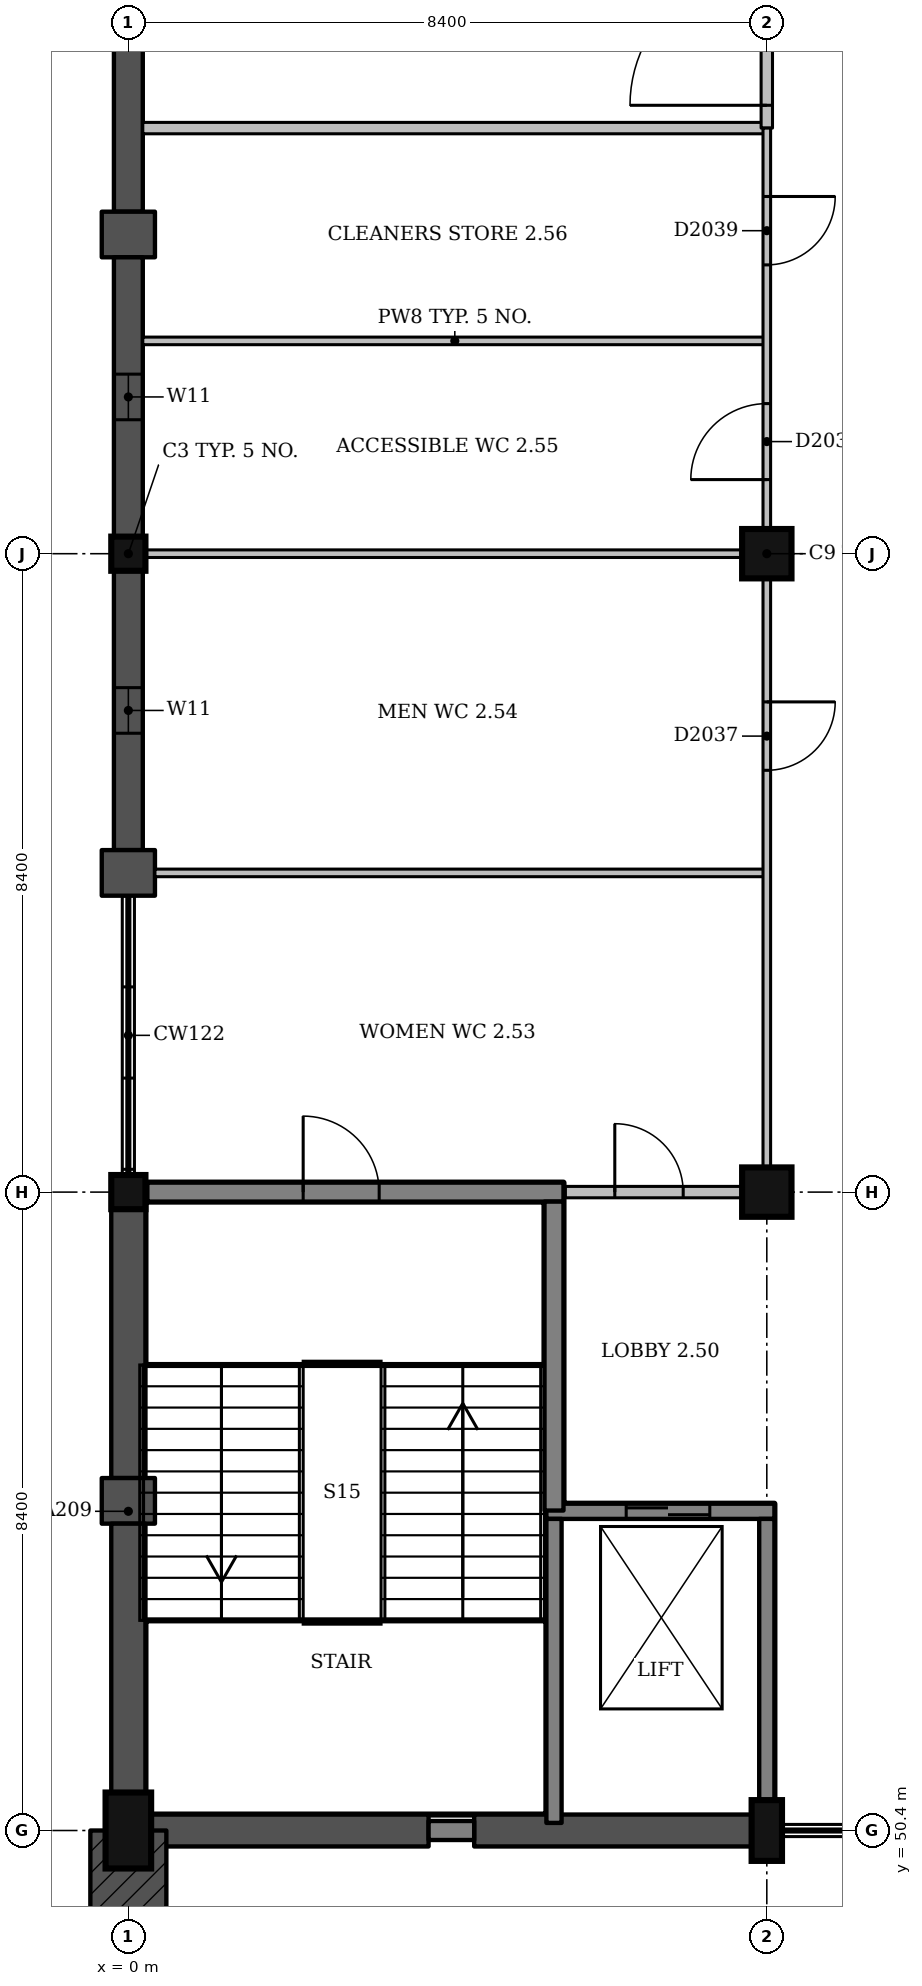
"""IFC4 building model, lengths in metres.
Left out: names, types, materials, properties, quantities, classifications, styles, units other than length and angle.
Written with IfcOpenShell. Run it as: python <this file> out.ifc"""

import sys

from ifc_helpers import new_model, si_unit, direction, frame, frame_2d, origin, origin_2d, place, context, subcontext, project, spatial, polyline, rectangle, outline, extrude, element, fill, save


model = new_model("IFC4")
c1 = context("Model", 3, precision=1e-05, world=origin(), true_north=direction((0.0, 1.0)))
c2 = subcontext(c1, "Body", "Model", "MODEL_VIEW")
j1 = project(units=[si_unit("LENGTHUNIT", "METRE"), si_unit("PLANEANGLEUNIT", "RADIAN")], contexts=[c1])
p1 = place(None, origin())
s1 = spatial("IfcSite", under=j1, at=p1, CompositionType="ELEMENT")
p2 = place(p1, origin())
s2 = spatial("IfcBuilding", under=s1, at=p2, CompositionType="ELEMENT")
p3 = place(p2, frame((0.0, 0.0, 9.0)))
s3 = spatial("IfcBuildingStorey", under=s2, at=p3, CompositionType="ELEMENT", Elevation=9.0)
p4 = place(p3, frame((0.0, 50.4, 0.0), z_axis=(0.0, 0.0, 1.0), x_axis=(1.0, 0.0, 0.0)))
e1 = element("IfcColumn", 1, at=p4, inside=s3, PredefinedType="COLUMN", context=c2, shape_type="SweptSolid", body=[
    extrude(rectangle(XDim=0.6, YDim=1.0, at=origin_2d()), origin(), (0.0, 0.0, 1.0), 4.5),
])
p5 = place(p3, frame((8.4, 50.4, 0.0), z_axis=(0.0, 0.0, 1.0), x_axis=(1.0, 0.0, 0.0)))
e2 = element("IfcColumn", 2, at=p5, inside=s3, PredefinedType="COLUMN", context=c2, shape_type="SweptSolid", body=[
    extrude(rectangle(XDim=0.4, YDim=0.8, at=origin_2d()), origin(), (0.0, 0.0, 1.0), 4.5),
])
for number, where, z_axis, x_axis in (
    (3, (0.0, 58.8, 0.0), (0.0, 0.0, 1.0), (1.0, 0.0, 0.0)),
    (4, (0.0, 67.2, 0.0), (0.0, 0.0, 1.0), (1.0, 0.0, 0.0)),
):
    element("IfcColumn", number, at=place(p3, frame(where, z_axis=z_axis, x_axis=x_axis)), inside=s3, PredefinedType="COLUMN", context=c2, shape_type="SweptSolid", body=[
        extrude(rectangle(XDim=0.45, YDim=0.45, at=origin_2d()), origin(), (0.0, 0.0, 1.0), 4.5),
    ])
for number, where, z_axis, x_axis in (
    (5, (8.4, 58.8, 0.0), (0.0, 0.0, 1.0), (1.0, 0.0, 0.0)),
    (6, (8.4, 67.2, 0.0), (0.0, 0.0, 1.0), (1.0, 0.0, 0.0)),
):
    element("IfcColumn", number, at=place(p3, frame(where, z_axis=z_axis, x_axis=x_axis)), inside=s3, PredefinedType="COLUMN", context=c2, shape_type="SweptSolid", body=[
        extrude(rectangle(XDim=0.65, YDim=0.65, at=origin_2d()), origin(), (0.0, 0.0, 1.0), 4.5),
    ])
p6 = place(p3, frame((5.5, 54.6, 0.0), z_axis=(0.0, 0.0, 1.0), x_axis=(1.0, 0.0, 0.0)))
e7 = element("IfcWall", 7, at=p6, inside=s3, PredefinedType="SHEAR", context=c2, shape_type="SweptSolid", body=[
    extrude(rectangle(XDim=3.0, YDim=0.2, at=frame_2d((1.5, 0.0))), origin(), (0.0, 0.0, 1.0), 4.5),
])
p7 = place(p6, frame((1.05, 0.0, 0.0)))
e8 = element("IfcOpeningElement", 8, at=p7, cuts=e7, PredefinedType="OPENING", context=c2, shape_type="SweptSolid", body=[
    extrude(rectangle(XDim=1.1, YDim=2.1, at=frame_2d((0.55, 1.05))), frame((0.0, 0.11, 0.0), z_axis=(0.0, -1.0, 0.0), x_axis=(1.0, 0.0, 0.0)), (0.0, 0.0, 1.0), 0.22),
])
p8 = place(p3, frame((5.6, 50.5, 0.0), z_axis=(0.0, 0.0, 1.0), x_axis=(0.0, 1.0, 0.0)))
e9 = element("IfcWall", 9, at=p8, inside=s3, PredefinedType="SHEAR", context=c2, shape_type="SweptSolid", body=[
    extrude(rectangle(XDim=4.0, YDim=0.2, at=frame_2d((2.0, 0.0))), origin(), (0.0, 0.0, 1.0), 4.5),
])
p9 = place(p3, frame((8.4, 50.8, 0.0), z_axis=(0.0, 0.0, 1.0), x_axis=(0.0, 1.0, 0.0)))
e10 = element("IfcWall", 10, at=p9, inside=s3, PredefinedType="SHEAR", context=c2, shape_type="SweptSolid", body=[
    extrude(rectangle(XDim=3.7, YDim=0.2, at=frame_2d((1.85, 0.0))), origin(), (0.0, 0.0, 1.0), 4.5),
])
p10 = place(p3, frame((0.25, 58.8, 0.0), z_axis=(0.0, 0.0, 1.0), x_axis=(1.0, 0.0, 0.0)))
e11 = element("IfcWall", 11, at=p10, inside=s3, PredefinedType="SHEAR", context=c2, shape_type="SweptSolid", body=[
    extrude(rectangle(XDim=5.475, YDim=0.25, at=frame_2d((2.738, 0.0))), origin(), (0.0, 0.0, 1.0), 4.5),
])
p11 = place(p10, frame((2.05, 0.0, 0.0)))
e12 = element("IfcOpeningElement", 12, at=p11, cuts=e11, PredefinedType="OPENING", context=c2, shape_type="SweptSolid", body=[
    extrude(rectangle(XDim=1.0, YDim=2.1, at=frame_2d((0.5, 1.05))), frame((0.0, 0.135, 0.0), z_axis=(0.0, -1.0, 0.0), x_axis=(1.0, 0.0, 0.0)), (0.0, 0.0, 1.0), 0.27),
])
p12 = place(p3, frame((5.6, 54.61, 0.0), z_axis=(0.0, 0.0, 1.0), x_axis=(0.0, 1.0, 0.0)))
e13 = element("IfcWall", 13, at=p12, inside=s3, PredefinedType="SHEAR", context=c2, shape_type="SweptSolid", body=[
    extrude(rectangle(XDim=4.065, YDim=0.25, at=frame_2d((2.032, 0.0))), origin(), (0.0, 0.0, 1.0), 4.5),
])
p13 = place(p3, frame((0.0, 16.8, 2.0), z_axis=(0.0, 0.0, 1.0), x_axis=(0.0, 1.0, 0.0)))
e14 = element("IfcWall", 14, at=p13, inside=s3, PredefinedType="SOLIDWALL", context=c2, shape_type="SweptSolid", body=[
    extrude(outline(polyline([(0.0, 0.0), (33.6, 0.0), (33.6, 16.5), (31.5, 15.753), (29.4, 15.115), (27.3, 14.583), (25.2, 14.152), (23.1, 13.819), (21.0, 13.583), (18.9, 13.442), (16.8, 13.395), (14.7, 13.442), (12.6, 13.583), (10.5, 13.819), (8.4, 14.152), (6.3, 14.583), (4.2, 15.115), (2.1, 15.753), (0.0, 16.5), (0.0, 0.0)])), frame((0.0, 0.5, 0.0), z_axis=(0.0, -1.0, 0.0), x_axis=(1.0, 0.0, 0.0)), (0.0, 0.0, 1.0), 1.0),
])
p14 = place(p3, frame((0.0, 75.375, 0.0), z_axis=(0.0, 0.0, 1.0), x_axis=(0.0, -1.0, 0.0)))
e15 = element("IfcWall", 15, at=p14, inside=s3, PredefinedType="SOLIDWALL", context=c2, shape_type="SweptSolid", body=[
    extrude(rectangle(XDim=3.675, YDim=0.38, at=frame_2d((1.837, 0.0))), origin(), (0.0, 0.0, 1.0), 3.35),
])
p15 = place(p3, frame((0.0, 71.7, 0.0), z_axis=(0.0, 0.0, 1.0), x_axis=(0.0, -1.0, 0.0)))
e16 = element("IfcWall", 16, at=p15, inside=s3, PredefinedType="SOLIDWALL", context=c2, shape_type="SweptSolid", body=[
    extrude(rectangle(XDim=0.6, YDim=0.7, at=frame_2d((0.3, 0.0))), origin(), (0.0, 0.0, 1.0), 3.35),
])
p16 = place(p3, frame((0.0, 71.1, 0.0), z_axis=(0.0, 0.0, 1.0), x_axis=(0.0, -1.0, 0.0)))
e17 = element("IfcWall", 17, at=p16, inside=s3, PredefinedType="SOLIDWALL", context=c2, shape_type="SweptSolid", body=[
    extrude(rectangle(XDim=3.675, YDim=0.38, at=frame_2d((1.837, 0.0))), origin(), (0.0, 0.0, 1.0), 3.35),
])
p17 = place(p16, frame((1.538, 0.0, 1.5)))
e18 = element("IfcOpeningElement", 18, at=p17, cuts=e17, PredefinedType="OPENING", context=c2, shape_type="SweptSolid", body=[
    extrude(rectangle(XDim=0.6, YDim=1.2, at=frame_2d((0.3, 0.6))), frame((0.0, 0.2, 0.0), z_axis=(0.0, -1.0, 0.0), x_axis=(1.0, 0.0, 0.0)), (0.0, 0.0, 1.0), 0.4),
])
p18 = place(p3, frame((0.0, 66.975, 0.0), z_axis=(0.0, 0.0, 1.0), x_axis=(0.0, -1.0, 0.0)))
e19 = element("IfcWall", 19, at=p18, inside=s3, PredefinedType="SOLIDWALL", context=c2, shape_type="SweptSolid", body=[
    extrude(rectangle(XDim=3.675, YDim=0.38, at=frame_2d((1.837, 0.0))), origin(), (0.0, 0.0, 1.0), 3.35),
])
p19 = place(p18, frame((1.538, 0.0, 1.5)))
e20 = element("IfcOpeningElement", 20, at=p19, cuts=e19, PredefinedType="OPENING", context=c2, shape_type="SweptSolid", body=[
    extrude(rectangle(XDim=0.6, YDim=1.2, at=frame_2d((0.3, 0.6))), frame((0.0, 0.2, 0.0), z_axis=(0.0, -1.0, 0.0), x_axis=(1.0, 0.0, 0.0)), (0.0, 0.0, 1.0), 0.4),
])
p20 = place(p3, frame((0.0, 63.3, 0.0), z_axis=(0.0, 0.0, 1.0), x_axis=(0.0, -1.0, 0.0)))
e21 = element("IfcWall", 21, at=p20, inside=s3, PredefinedType="SOLIDWALL", context=c2, shape_type="SweptSolid", body=[
    extrude(rectangle(XDim=0.6, YDim=0.7, at=frame_2d((0.3, 0.0))), origin(), (0.0, 0.0, 1.0), 3.35),
])
p21 = place(p3, frame((0.0, 58.575, 0.0), z_axis=(0.0, 0.0, 1.0), x_axis=(0.0, -1.0, 0.0)))
e22 = element("IfcWall", 22, at=p21, inside=s3, PredefinedType="SOLIDWALL", context=c2, shape_type="SweptSolid", body=[
    extrude(rectangle(XDim=3.537, YDim=0.45, at=frame_2d((1.769, 0.0))), origin(), (0.0, 0.0, 1.0), 4.5),
])
p22 = place(p3, frame((0.0, 55.038, 0.0), z_axis=(0.0, 0.0, 1.0), x_axis=(0.0, -1.0, 0.0)))
e23 = element("IfcWall", 23, at=p22, inside=s3, PredefinedType="SOLIDWALL", context=c2, shape_type="SweptSolid", body=[
    extrude(rectangle(XDim=0.6, YDim=0.7, at=frame_2d((0.3, 0.0))), origin(), (0.0, 0.0, 1.0), 4.5),
])
p23 = place(p3, frame((0.0, 54.438, 0.0), z_axis=(0.0, 0.0, 1.0), x_axis=(0.0, -1.0, 0.0)))
e24 = element("IfcWall", 24, at=p23, inside=s3, PredefinedType="SOLIDWALL", context=c2, shape_type="SweptSolid", body=[
    extrude(rectangle(XDim=3.538, YDim=0.45, at=frame_2d((1.769, 0.0))), origin(), (0.0, 0.0, 1.0), 4.5),
])
for number, where, z_axis, x_axis in (
    (25, (0.3, 50.4, 0.0), (0.0, 0.0, 1.0), (1.0, 0.0, 0.0)),
    (26, (4.55, 50.4, 0.0), (0.0, 0.0, 1.0), (1.0, 0.0, 0.0)),
):
    element("IfcWall", number, at=place(p3, frame(where, z_axis=z_axis, x_axis=x_axis)), inside=s3, PredefinedType="SOLIDWALL", context=c2, shape_type="SweptSolid", body=[
        extrude(rectangle(XDim=3.65, YDim=0.42, at=frame_2d((1.825, 0.0))), origin(), (0.0, 0.0, 1.0), 3.65),
    ])
p24 = place(p3, frame((5.75, 58.8, 0.0), z_axis=(0.0, 0.0, 1.0), x_axis=(1.0, 0.0, 0.0)))
e27 = element("IfcWall", 27, at=p24, inside=s3, PredefinedType="PARTITIONING", context=c2, shape_type="SweptSolid", body=[
    extrude(rectangle(XDim=2.325, YDim=0.15, at=frame_2d((1.163, 0.0))), origin(), (0.0, 0.0, 1.0), 3.5),
])
p25 = place(p24, frame((0.65, 0.0, 0.0)))
e28 = element("IfcOpeningElement", 28, at=p25, cuts=e27, PredefinedType="OPENING", context=c2, shape_type="SweptSolid", body=[
    extrude(rectangle(XDim=0.9, YDim=2.1, at=frame_2d((0.45, 1.05))), frame((0.0, 0.085, 0.0), z_axis=(0.0, -1.0, 0.0), x_axis=(1.0, 0.0, 0.0)), (0.0, 0.0, 1.0), 0.17),
])
p26 = place(p3, frame((0.35, 63.0, 0.0), z_axis=(0.0, 0.0, 1.0), x_axis=(1.0, 0.0, 0.0)))
e29 = element("IfcWall", 29, at=p26, inside=s3, PredefinedType="PARTITIONING", context=c2, shape_type="SweptSolid", body=[
    extrude(rectangle(XDim=8.05, YDim=0.1, at=frame_2d((4.025, 0.0))), origin(), (0.0, 0.0, 1.0), 3.4),
])
p27 = place(p3, frame((0.225, 67.2, 0.0), z_axis=(0.0, 0.0, 1.0), x_axis=(1.0, 0.0, 0.0)))
e30 = element("IfcWall", 30, at=p27, inside=s3, PredefinedType="PARTITIONING", context=c2, shape_type="SweptSolid", body=[
    extrude(rectangle(XDim=7.85, YDim=0.1, at=frame_2d((3.925, 0.0))), origin(), (0.0, 0.0, 1.0), 3.4),
])
p28 = place(p3, frame((0.19, 70.0, 0.0), z_axis=(0.0, 0.0, 1.0), x_axis=(1.0, 0.0, 0.0)))
e31 = element("IfcWall", 31, at=p28, inside=s3, PredefinedType="PARTITIONING", context=c2, shape_type="SweptSolid", body=[
    extrude(rectangle(XDim=8.21, YDim=0.1, at=frame_2d((4.105, 0.0))), origin(), (0.0, 0.0, 1.0), 3.35),
])
p29 = place(p3, frame((0.19, 72.8, 0.0), z_axis=(0.0, 0.0, 1.0), x_axis=(1.0, 0.0, 0.0)))
e32 = element("IfcWall", 32, at=p29, inside=s3, PredefinedType="PARTITIONING", context=c2, shape_type="SweptSolid", body=[
    extrude(rectangle(XDim=8.21, YDim=0.15, at=frame_2d((4.105, 0.0))), origin(), (0.0, 0.0, 1.0), 3.35),
])
p30 = place(p3, frame((8.4, 72.8, 0.0), z_axis=(0.0, 0.0, 1.0), x_axis=(0.0, 1.0, 0.0)))
e33 = element("IfcWall", 33, at=p30, inside=s3, PredefinedType="PARTITIONING", context=c2, shape_type="SweptSolid", body=[
    extrude(rectangle(XDim=2.475, YDim=0.15, at=frame_2d((1.237, 0.0))), origin(), (0.0, 0.0, 1.0), 3.4),
])
p31 = place(p30, frame((0.3, 0.0, 0.0)))
e34 = element("IfcOpeningElement", 34, at=p31, cuts=e33, PredefinedType="OPENING", context=c2, shape_type="SweptSolid", body=[
    extrude(rectangle(XDim=1.8, YDim=2.1, at=frame_2d((0.9, 1.05))), frame((0.0, 0.085, 0.0), z_axis=(0.0, -1.0, 0.0), x_axis=(1.0, 0.0, 0.0)), (0.0, 0.0, 1.0), 0.17),
])
p32 = place(p3, frame((8.4, 59.125, 0.0), z_axis=(0.0, 0.0, 1.0), x_axis=(0.0, 1.0, 0.0)))
e35 = element("IfcWall", 35, at=p32, inside=s3, PredefinedType="PARTITIONING", context=c2, shape_type="SweptSolid", body=[
    extrude(rectangle(XDim=7.75, YDim=0.1, at=frame_2d((3.875, 0.0))), origin(), (0.0, 0.0, 1.0), 3.4),
])
p33 = place(p32, frame((5.225, 0.0, 0.0)))
e36 = element("IfcOpeningElement", 36, at=p33, cuts=e35, PredefinedType="OPENING", context=c2, shape_type="SweptSolid", body=[
    extrude(rectangle(XDim=0.9, YDim=2.1, at=frame_2d((0.45, 1.05))), frame((0.0, 0.06, 0.0), z_axis=(0.0, -1.0, 0.0), x_axis=(1.0, 0.0, 0.0)), (0.0, 0.0, 1.0), 0.12),
])
p34 = place(p3, frame((8.4, 67.525, 0.0), z_axis=(0.0, 0.0, 1.0), x_axis=(0.0, 1.0, 0.0)))
e37 = element("IfcWall", 37, at=p34, inside=s3, PredefinedType="PARTITIONING", context=c2, shape_type="SweptSolid", body=[
    extrude(rectangle(XDim=5.275, YDim=0.1, at=frame_2d((2.638, 0.0))), origin(), (0.0, 0.0, 1.0), 3.4),
])
p35 = place(p34, frame((0.65, 0.0, 0.0)))
e38 = element("IfcOpeningElement", 38, at=p35, cuts=e37, PredefinedType="OPENING", context=c2, shape_type="SweptSolid", body=[
    extrude(rectangle(XDim=1.0, YDim=2.1, at=frame_2d((0.5, 1.05))), frame((0.0, 0.06, 0.0), z_axis=(0.0, -1.0, 0.0), x_axis=(1.0, 0.0, 0.0)), (0.0, 0.0, 1.0), 0.12),
])
p36 = place(p34, frame((3.475, 0.0, 0.0)))
e39 = element("IfcOpeningElement", 39, at=p36, cuts=e37, PredefinedType="OPENING", context=c2, shape_type="SweptSolid", body=[
    extrude(rectangle(XDim=0.9, YDim=2.1, at=frame_2d((0.45, 1.05))), frame((0.0, 0.06, 0.0), z_axis=(0.0, -1.0, 0.0), x_axis=(1.0, 0.0, 0.0)), (0.0, 0.0, 1.0), 0.12),
])
p37 = place(p3, frame((3.95, 50.4, 0.0), z_axis=(0.0, 0.0, 1.0), x_axis=(1.0, 0.0, 0.0)))
e40 = element("IfcWall", 40, at=p37, inside=s3, PredefinedType="SHEAR", context=c2, shape_type="SweptSolid", body=[
    extrude(rectangle(XDim=0.6, YDim=0.25, at=frame_2d((0.3, 0.0))), origin(), (0.0, 0.0, 1.0), 4.5),
])
p38 = place(p17, origin())
e41 = element("IfcWindow", 41, at=p38, inside=s3, PartitioningType="SINGLE_PANEL", PredefinedType="WINDOW", context=c2, shape_type="SweptSolid", body=[
    extrude(rectangle(XDim=0.6, YDim=1.2, at=frame_2d((0.3, 0.6))), frame((0.0, 0.15, 0.0), z_axis=(0.0, -1.0, 0.0), x_axis=(1.0, 0.0, 0.0)), (0.0, 0.0, 1.0), 0.06),
])
fill(e18, e41)
p39 = place(p19, origin())
e42 = element("IfcWindow", 42, at=p39, inside=s3, PartitioningType="SINGLE_PANEL", PredefinedType="WINDOW", context=c2, shape_type="SweptSolid", body=[
    extrude(rectangle(XDim=0.6, YDim=1.2, at=frame_2d((0.3, 0.6))), frame((0.0, 0.15, 0.0), z_axis=(0.0, -1.0, 0.0), x_axis=(1.0, 0.0, 0.0)), (0.0, 0.0, 1.0), 0.06),
])
fill(e20, e42)
p40 = place(p25, origin())
e43 = element("IfcDoor", 43, at=p40, inside=s3, OperationType="SINGLE_SWING_LEFT", PredefinedType="DOOR", context=c2, shape_type="SweptSolid", body=[
    extrude(rectangle(XDim=0.9, YDim=2.1, at=frame_2d((0.45, 1.05))), frame((0.0, 0.025, 0.0), z_axis=(0.0, -1.0, 0.0), x_axis=(1.0, 0.0, 0.0)), (0.0, 0.0, 1.0), 0.05),
])
fill(e28, e43)
p41 = place(p33, origin())
e44 = element("IfcDoor", 44, at=p41, inside=s3, OperationType="SINGLE_SWING_RIGHT", PredefinedType="DOOR", context=c2, shape_type="SweptSolid", body=[
    extrude(rectangle(XDim=0.9, YDim=2.1, at=frame_2d((0.45, 1.05))), frame((0.0, 0.025, 0.0), z_axis=(0.0, -1.0, 0.0), x_axis=(1.0, 0.0, 0.0)), (0.0, 0.0, 1.0), 0.05),
])
fill(e36, e44)
p42 = place(p35, origin())
e45 = element("IfcDoor", 45, at=p42, inside=s3, OperationType="SINGLE_SWING_LEFT", PredefinedType="DOOR", context=c2, shape_type="SweptSolid", body=[
    extrude(rectangle(XDim=1.0, YDim=2.1, at=frame_2d((0.5, 1.05))), frame((0.0, 0.025, 0.0), z_axis=(0.0, -1.0, 0.0), x_axis=(1.0, 0.0, 0.0)), (0.0, 0.0, 1.0), 0.05),
])
fill(e38, e45)
p43 = place(p36, origin())
e46 = element("IfcDoor", 46, at=p43, inside=s3, OperationType="SINGLE_SWING_RIGHT", PredefinedType="DOOR", context=c2, shape_type="SweptSolid", body=[
    extrude(rectangle(XDim=0.9, YDim=2.1, at=frame_2d((0.45, 1.05))), frame((0.0, 0.025, 0.0), z_axis=(0.0, -1.0, 0.0), x_axis=(1.0, 0.0, 0.0)), (0.0, 0.0, 1.0), 0.05),
])
fill(e39, e46)
p44 = place(p31, origin())
e47 = element("IfcDoor", 47, at=p44, inside=s3, OperationType="DOUBLE_DOOR_SINGLE_SWING", PredefinedType="DOOR", context=c2, shape_type="SweptSolid", body=[
    extrude(rectangle(XDim=1.8, YDim=2.1, at=frame_2d((0.9, 1.05))), frame((0.0, 0.025, 0.0), z_axis=(0.0, -1.0, 0.0), x_axis=(1.0, 0.0, 0.0)), (0.0, 0.0, 1.0), 0.05),
])
fill(e34, e47)
p45 = place(p11, origin())
e48 = element("IfcDoor", 48, at=p45, inside=s3, OperationType="SINGLE_SWING_LEFT", PredefinedType="DOOR", context=c2, shape_type="SweptSolid", body=[
    extrude(rectangle(XDim=1.0, YDim=2.1, at=frame_2d((0.5, 1.05))), frame((0.0, 0.025, 0.0), z_axis=(0.0, -1.0, 0.0), x_axis=(1.0, 0.0, 0.0)), (0.0, 0.0, 1.0), 0.05),
])
fill(e12, e48)
p46 = place(p7, origin())
e49 = element("IfcDoor", 49, at=p46, inside=s3, OperationType="SLIDING_TO_LEFT", PredefinedType="DOOR", context=c2, shape_type="SweptSolid", body=[
    extrude(rectangle(XDim=1.1, YDim=2.1, at=frame_2d((0.55, 1.05))), frame((0.0, 0.025, 0.0), z_axis=(0.0, -1.0, 0.0), x_axis=(1.0, 0.0, 0.0)), (0.0, 0.0, 1.0), 0.05),
])
fill(e8, e49)
save(model, sys.argv[1])
